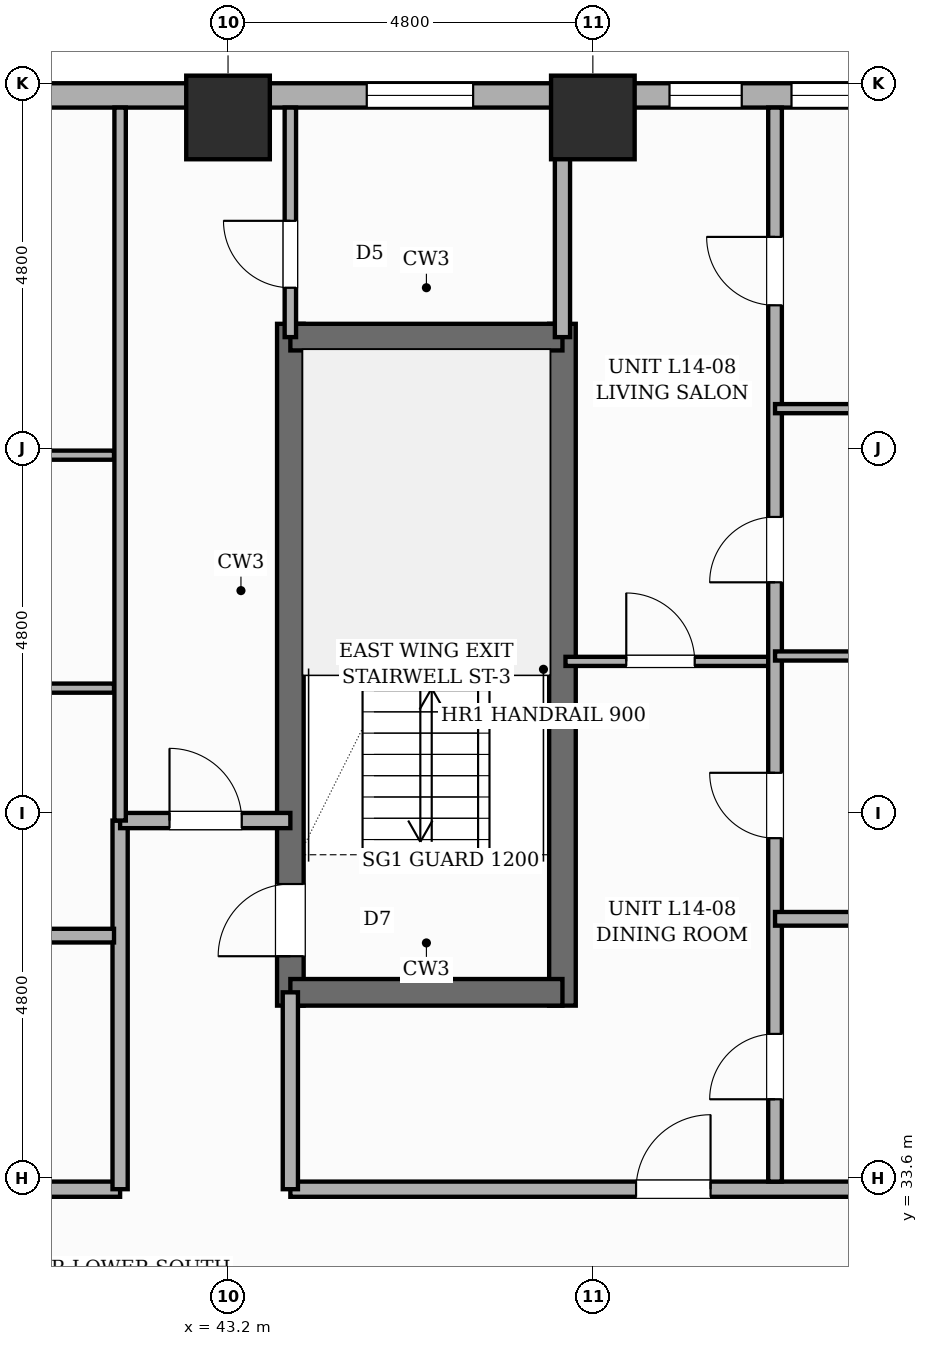
"""IFC4 building model, lengths in metres.
Left out: names, types, materials, properties, quantities, classifications, styles, units other than length and angle.
Written with IfcOpenShell. Run it as: python <this file> out.ifc"""

import sys

from ifc_helpers import new_model, si_unit, direction, frame, frame_2d, origin, origin_2d, place, context, subcontext, project, spatial, rectangle, extrude, element, fill, save


model = new_model("IFC4")
c1 = context("Model", 3, precision=1e-05, world=origin(), true_north=direction((0.0, 1.0)))
c2 = subcontext(c1, "Body", "Model", "MODEL_VIEW")
j1 = project(units=[si_unit("LENGTHUNIT", "METRE"), si_unit("PLANEANGLEUNIT", "RADIAN")], contexts=[c1])
p1 = place(None, origin())
s1 = spatial("IfcSite", under=j1, at=p1, CompositionType="ELEMENT")
p2 = place(p1, origin())
s2 = spatial("IfcBuilding", under=s1, at=p2, CompositionType="ELEMENT")
p3 = place(p2, frame((0.0, 0.0, 57.4)))
s3 = spatial("IfcBuildingStorey", under=s2, at=p3, CompositionType="ELEMENT", Elevation=57.4)
p4 = place(p3, frame((44.02, 35.865, 0.0), z_axis=(0.0, 0.0, 1.0), x_axis=(0.0, 1.0, 0.0)))
e1 = element("IfcWall", 1, at=p4, inside=s3, PredefinedType="SHEAR", context=c2, shape_type="SweptSolid", body=[
    extrude(rectangle(XDim=8.97, YDim=0.35, at=frame_2d((4.485, 0.0))), origin(), (0.0, 0.0, 1.0), 3.6),
])
p5 = place(p4, frame((0.65, 0.0, 0.0)))
e2 = element("IfcOpeningElement", 2, at=p5, cuts=e1, PredefinedType="OPENING", context=c2, shape_type="SweptSolid", body=[
    extrude(rectangle(XDim=0.95, YDim=2.1, at=frame_2d((0.475, 1.05))), frame((0.0, 0.185, 0.0), z_axis=(0.0, -1.0, 0.0), x_axis=(1.0, 0.0, 0.0)), (0.0, 0.0, 1.0), 0.37),
])
p6 = place(p3, frame((47.6, 35.865, 0.0), z_axis=(0.0, 0.0, 1.0), x_axis=(0.0, 1.0, 0.0)))
e3 = element("IfcWall", 3, at=p6, inside=s3, PredefinedType="SHEAR", context=c2, shape_type="SweptSolid", body=[
    extrude(rectangle(XDim=8.97, YDim=0.35, at=frame_2d((4.485, 0.0))), origin(), (0.0, 0.0, 1.0), 3.6),
])
for number, where, z_axis, x_axis in (
    (4, (44.02, 36.04, 0.0), (0.0, 0.0, 1.0), (1.0, 0.0, 0.0)),
    (5, (44.02, 44.66, 0.0), (0.0, 0.0, 1.0), (1.0, 0.0, 0.0)),
):
    element("IfcWall", number, at=place(p3, frame(where, z_axis=z_axis, x_axis=x_axis)), inside=s3, PredefinedType="SHEAR", context=c2, shape_type="SweptSolid", body=[
        extrude(rectangle(XDim=3.58, YDim=0.35, at=frame_2d((1.79, 0.0))), origin(), (0.0, 0.0, 1.0), 3.6),
    ])
for number, where, z_axis, x_axis in (
    (6, (43.2, 47.55, 0.0), (0.0, 0.0, 1.0), (1.0, 0.0, 0.0)),
    (7, (48.0, 47.55, 0.0), (0.0, 0.0, 1.0), (1.0, 0.0, 0.0)),
):
    element("IfcColumn", number, at=place(p3, frame(where, z_axis=z_axis, x_axis=x_axis)), inside=s3, PredefinedType="COLUMN", context=c2, shape_type="SweptSolid", body=[
        extrude(rectangle(XDim=1.1, YDim=1.1, at=origin_2d()), origin(), (0.0, 0.0, 1.0), 3.6),
    ])
p7 = place(p3, frame((7.2, 47.84, 0.0), z_axis=(0.0, 0.0, 1.0), x_axis=(1.0, 0.0, 0.0)))
e8 = element("IfcWall", 8, at=p7, inside=s3, PredefinedType="STANDARD", context=c2, shape_type="SweptSolid", body=[
    extrude(rectangle(XDim=48.0, YDim=0.32, at=frame_2d((24.0, 0.0))), origin(), (0.0, 0.0, 1.0), 2.53),
])
p8 = place(p7, frame((28.803, 0.0, 0.65)))
e9 = element("IfcOpeningElement", 9, at=p8, cuts=e8, PredefinedType="OPENING", context=c2, shape_type="SweptSolid", body=[
    extrude(rectangle(XDim=1.4, YDim=1.1, at=frame_2d((0.7, 0.55))), frame((0.0, 0.17, 0.0), z_axis=(0.0, -1.0, 0.0), x_axis=(1.0, 0.0, 0.0)), (0.0, 0.0, 1.0), 0.34),
])
p9 = place(p7, frame((43.414, 0.0, 0.45)))
e10 = element("IfcOpeningElement", 10, at=p9, cuts=e8, PredefinedType="OPENING", context=c2, shape_type="SweptSolid", body=[
    extrude(rectangle(XDim=0.95, YDim=1.8, at=frame_2d((0.475, 0.9))), frame((0.0, 0.17, 0.0), z_axis=(0.0, -1.0, 0.0), x_axis=(1.0, 0.0, 0.0)), (0.0, 0.0, 1.0), 0.34),
])
p10 = place(p7, frame((18.74, 0.0, 0.45)))
e11 = element("IfcOpeningElement", 11, at=p10, cuts=e8, PredefinedType="OPENING", context=c2, shape_type="SweptSolid", body=[
    extrude(rectangle(XDim=0.95, YDim=1.8, at=frame_2d((0.475, 0.9))), frame((0.0, 0.17, 0.0), z_axis=(0.0, -1.0, 0.0), x_axis=(1.0, 0.0, 0.0)), (0.0, 0.0, 1.0), 0.34),
])
p11 = place(p7, frame((37.825, 0.0, 0.65)))
e12 = element("IfcOpeningElement", 12, at=p11, cuts=e8, PredefinedType="OPENING", context=c2, shape_type="SweptSolid", body=[
    extrude(rectangle(XDim=1.4, YDim=1.1, at=frame_2d((0.7, 0.55))), frame((0.0, 0.17, 0.0), z_axis=(0.0, -1.0, 0.0), x_axis=(1.0, 0.0, 0.0)), (0.0, 0.0, 1.0), 0.34),
])
p12 = place(p7, frame((0.47, 0.0, 0.45)))
e13 = element("IfcOpeningElement", 13, at=p12, cuts=e8, PredefinedType="OPENING", context=c2, shape_type="SweptSolid", body=[
    extrude(rectangle(XDim=0.95, YDim=1.8, at=frame_2d((0.475, 0.9))), frame((0.0, 0.17, 0.0), z_axis=(0.0, -1.0, 0.0), x_axis=(1.0, 0.0, 0.0)), (0.0, 0.0, 1.0), 0.34),
])
p13 = place(p7, frame((5.265, 0.0, 0.45)))
e14 = element("IfcOpeningElement", 14, at=p13, cuts=e8, PredefinedType="OPENING", context=c2, shape_type="SweptSolid", body=[
    extrude(rectangle(XDim=0.95, YDim=1.8, at=frame_2d((0.475, 0.9))), frame((0.0, 0.17, 0.0), z_axis=(0.0, -1.0, 0.0), x_axis=(1.0, 0.0, 0.0)), (0.0, 0.0, 1.0), 0.34),
])
p14 = place(p7, frame((23.43, 0.0, 0.65)))
e15 = element("IfcOpeningElement", 15, at=p14, cuts=e8, PredefinedType="OPENING", context=c2, shape_type="SweptSolid", body=[
    extrude(rectangle(XDim=1.4, YDim=1.1, at=frame_2d((0.7, 0.55))), frame((0.0, 0.17, 0.0), z_axis=(0.0, -1.0, 0.0), x_axis=(1.0, 0.0, 0.0)), (0.0, 0.0, 1.0), 0.34),
])
p15 = place(p7, frame((41.809, 0.0, 0.45)))
e16 = element("IfcOpeningElement", 16, at=p15, cuts=e8, PredefinedType="OPENING", context=c2, shape_type="SweptSolid", body=[
    extrude(rectangle(XDim=0.95, YDim=1.8, at=frame_2d((0.475, 0.9))), frame((0.0, 0.17, 0.0), z_axis=(0.0, -1.0, 0.0), x_axis=(1.0, 0.0, 0.0)), (0.0, 0.0, 1.0), 0.34),
])
p16 = place(p3, frame((27.35, 33.45, 0.0), z_axis=(0.0, 0.0, 1.0), x_axis=(1.0, 0.0, 0.0)))
e17 = element("IfcWall", 17, at=p16, inside=s3, PredefinedType="PARTITIONING", context=c2, shape_type="SweptSolid", body=[
    extrude(rectangle(XDim=14.43, YDim=0.2, at=frame_2d((7.215, 0.0))), origin(), (0.0, 0.0, 1.0), 3.35),
])
p17 = place(p16, frame((4.803, 0.0, 0.0)))
e18 = element("IfcOpeningElement", 18, at=p17, cuts=e17, PredefinedType="OPENING", context=c2, shape_type="SweptSolid", body=[
    extrude(rectangle(XDim=0.98, YDim=2.18, at=frame_2d((0.49, 1.09))), frame((0.0, 0.11, 0.0), z_axis=(0.0, -1.0, 0.0), x_axis=(1.0, 0.0, 0.0)), (0.0, 0.0, 1.0), 0.22),
])
p18 = place(p3, frame((44.02, 33.45, 0.0), z_axis=(0.0, 0.0, 1.0), x_axis=(1.0, 0.0, 0.0)))
e19 = element("IfcWall", 19, at=p18, inside=s3, PredefinedType="PARTITIONING", context=c2, shape_type="SweptSolid", body=[
    extrude(rectangle(XDim=13.26, YDim=0.2, at=frame_2d((6.63, 0.0))), origin(), (0.0, 0.0, 1.0), 2.53),
])
p19 = place(p18, frame((4.549, 0.0, 0.0)))
e20 = element("IfcOpeningElement", 20, at=p19, cuts=e19, PredefinedType="OPENING", context=c2, shape_type="SweptSolid", body=[
    extrude(rectangle(XDim=0.98, YDim=2.18, at=frame_2d((0.49, 1.09))), frame((0.0, 0.11, 0.0), z_axis=(0.0, -1.0, 0.0), x_axis=(1.0, 0.0, 0.0)), (0.0, 0.0, 1.0), 0.22),
])
p20 = place(p3, frame((41.78, 33.45, 0.0), z_axis=(0.0, 0.0, 1.0), x_axis=(0.0, 1.0, 0.0)))
e21 = element("IfcWall", 21, at=p20, inside=s3, PredefinedType="PARTITIONING", context=c2, shape_type="SweptSolid", body=[
    extrude(rectangle(XDim=4.85, YDim=0.2, at=frame_2d((2.425, 0.0))), origin(), (0.0, 0.0, 1.0), 3.35),
])
p21 = place(p3, frame((41.78, 38.3, 0.0), z_axis=(0.0, 0.0, 1.0), x_axis=(1.0, 0.0, 0.0)))
e22 = element("IfcWall", 22, at=p21, inside=s3, PredefinedType="PARTITIONING", context=c2, shape_type="SweptSolid", body=[
    extrude(rectangle(XDim=2.24, YDim=0.2, at=frame_2d((1.12, 0.0))), origin(), (0.0, 0.0, 1.0), 3.35),
])
p22 = place(p21, frame((0.65, 0.0, 0.0)))
e23 = element("IfcOpeningElement", 23, at=p22, cuts=e22, PredefinedType="OPENING", context=c2, shape_type="SweptSolid", body=[
    extrude(rectangle(XDim=0.95, YDim=2.15, at=frame_2d((0.475, 1.075))), frame((0.0, 0.11, 0.0), z_axis=(0.0, -1.0, 0.0), x_axis=(1.0, 0.0, 0.0)), (0.0, 0.0, 1.0), 0.22),
])
p23 = place(p3, frame((35.577, 36.786, 0.0), z_axis=(0.0, 0.0, 1.0), x_axis=(1.0, 0.0, 0.0)))
e24 = element("IfcWall", 24, at=p23, inside=s3, PredefinedType="PLUMBINGWALL", context=c2, shape_type="SweptSolid", body=[
    extrude(rectangle(XDim=6.123, YDim=0.18, at=frame_2d((3.062, 0.0))), origin(), (0.0, 0.0, 1.0), 3.35),
])
for number, where, z_axis, x_axis in (
    (25, (35.577, 40.042, 0.0), (0.0, 0.0, 1.0), (1.0, 0.0, 0.0)),
    (26, (35.577, 43.107, 0.0), (0.0, 0.0, 1.0), (1.0, 0.0, 0.0)),
):
    element("IfcWall", number, at=place(p3, frame(where, z_axis=z_axis, x_axis=x_axis)), inside=s3, PredefinedType="PARTITIONING", context=c2, shape_type="SweptSolid", body=[
        extrude(rectangle(XDim=6.123, YDim=0.12, at=frame_2d((3.062, 0.0))), origin(), (0.0, 0.0, 1.0), 3.35),
    ])
p24 = place(p3, frame((41.78, 38.3, 0.0), z_axis=(0.0, 0.0, 1.0), x_axis=(0.0, 1.0, 0.0)))
e27 = element("IfcWall", 27, at=p24, inside=s3, PredefinedType="PARTITIONING", context=c2, shape_type="SweptSolid", body=[
    extrude(rectangle(XDim=9.38, YDim=0.15, at=frame_2d((4.69, 0.0))), origin(), (0.0, 0.0, 1.0), 3.35),
])
p25 = place(p3, frame((47.64, 40.394, 0.0), z_axis=(0.0, 0.0, 1.0), x_axis=(1.0, 0.0, 0.0)))
e28 = element("IfcWall", 28, at=p25, inside=s3, PredefinedType="PARTITIONING", context=c2, shape_type="SweptSolid", body=[
    extrude(rectangle(XDim=2.757, YDim=0.12, at=frame_2d((1.378, 0.0))), origin(), (0.0, 0.0, 1.0), 3.35),
])
p26 = place(p25, frame((0.8, 0.0, 0.0)))
e29 = element("IfcOpeningElement", 29, at=p26, cuts=e28, PredefinedType="OPENING", context=c2, shape_type="SweptSolid", body=[
    extrude(rectangle(XDim=0.9, YDim=2.15, at=frame_2d((0.45, 1.075))), frame((0.0, 0.07, 0.0), z_axis=(0.0, -1.0, 0.0), x_axis=(1.0, 0.0, 0.0)), (0.0, 0.0, 1.0), 0.14),
])
p27 = place(p3, frame((50.397, 33.55, 0.0), z_axis=(0.0, 0.0, 1.0), x_axis=(0.0, 1.0, 0.0)))
e30 = element("IfcWall", 30, at=p27, inside=s3, PredefinedType="PLUMBINGWALL", context=c2, shape_type="SweptSolid", body=[
    extrude(rectangle(XDim=14.13, YDim=0.18, at=frame_2d((7.065, 0.0))), origin(), (0.0, 0.0, 1.0), 3.35),
])
p28 = place(p27, frame((1.083, 0.0, 0.0)))
e31 = element("IfcOpeningElement", 31, at=p28, cuts=e30, PredefinedType="OPENING", context=c2, shape_type="SweptSolid", body=[
    extrude(rectangle(XDim=0.86, YDim=2.1, at=frame_2d((0.43, 1.05))), frame((0.0, 0.1, 0.0), z_axis=(0.0, -1.0, 0.0), x_axis=(1.0, 0.0, 0.0)), (0.0, 0.0, 1.0), 0.2),
])
p29 = place(p27, frame((4.518, 0.0, 0.0)))
e32 = element("IfcOpeningElement", 32, at=p29, cuts=e30, PredefinedType="OPENING", context=c2, shape_type="SweptSolid", body=[
    extrude(rectangle(XDim=0.86, YDim=2.1, at=frame_2d((0.43, 1.05))), frame((0.0, 0.1, 0.0), z_axis=(0.0, -1.0, 0.0), x_axis=(1.0, 0.0, 0.0)), (0.0, 0.0, 1.0), 0.2),
])
p30 = place(p27, frame((7.884, 0.0, 0.0)))
e33 = element("IfcOpeningElement", 33, at=p30, cuts=e30, PredefinedType="OPENING", context=c2, shape_type="SweptSolid", body=[
    extrude(rectangle(XDim=0.86, YDim=2.1, at=frame_2d((0.43, 1.05))), frame((0.0, 0.1, 0.0), z_axis=(0.0, -1.0, 0.0), x_axis=(1.0, 0.0, 0.0)), (0.0, 0.0, 1.0), 0.2),
])
p31 = place(p27, frame((11.528, 0.0, 0.0)))
e34 = element("IfcOpeningElement", 34, at=p31, cuts=e30, PredefinedType="OPENING", context=c2, shape_type="SweptSolid", body=[
    extrude(rectangle(XDim=0.9, YDim=2.15, at=frame_2d((0.45, 1.075))), frame((0.0, 0.1, 0.0), z_axis=(0.0, -1.0, 0.0), x_axis=(1.0, 0.0, 0.0)), (0.0, 0.0, 1.0), 0.2),
])
p32 = place(p3, frame((50.397, 37.007, 0.0), z_axis=(0.0, 0.0, 1.0), x_axis=(1.0, 0.0, 0.0)))
e35 = element("IfcWall", 35, at=p32, inside=s3, PredefinedType="PLUMBINGWALL", context=c2, shape_type="SweptSolid", body=[
    extrude(rectangle(XDim=6.883, YDim=0.18, at=frame_2d((3.441, 0.0))), origin(), (0.0, 0.0, 1.0), 3.35),
])
for number, where, z_axis, x_axis in (
    (36, (50.397, 40.465, 0.0), (0.0, 0.0, 1.0), (1.0, 0.0, 0.0)),
    (37, (50.397, 43.719, 0.0), (0.0, 0.0, 1.0), (1.0, 0.0, 0.0)),
):
    element("IfcWall", number, at=place(p3, frame(where, z_axis=z_axis, x_axis=x_axis)), inside=s3, PredefinedType="PARTITIONING", context=c2, shape_type="SweptSolid", body=[
        extrude(rectangle(XDim=6.883, YDim=0.12, at=frame_2d((3.441, 0.0))), origin(), (0.0, 0.0, 1.0), 3.35),
    ])
p33 = place(p3, frame((44.02, 44.66, 0.0), z_axis=(0.0, 0.0, 1.0), x_axis=(0.0, 1.0, 0.0)))
e38 = element("IfcWall", 38, at=p33, inside=s3, PredefinedType="PARTITIONING", context=c2, shape_type="SweptSolid", body=[
    extrude(rectangle(XDim=3.02, YDim=0.15, at=frame_2d((1.51, 0.0))), origin(), (0.0, 0.0, 1.0), 3.35),
])
p34 = place(p33, frame((0.65, 0.0, 0.0)))
e39 = element("IfcOpeningElement", 39, at=p34, cuts=e38, PredefinedType="OPENING", context=c2, shape_type="SweptSolid", body=[
    extrude(rectangle(XDim=0.88, YDim=2.1, at=frame_2d((0.44, 1.05))), frame((0.0, 0.085, 0.0), z_axis=(0.0, -1.0, 0.0), x_axis=(1.0, 0.0, 0.0)), (0.0, 0.0, 1.0), 0.17),
])
p35 = place(p3, frame((47.6, 44.66, 0.0), z_axis=(0.0, 0.0, 1.0), x_axis=(0.0, 1.0, 0.0)))
e40 = element("IfcWall", 40, at=p35, inside=s3, PredefinedType="SOLIDWALL", context=c2, shape_type="SweptSolid", body=[
    extrude(rectangle(XDim=3.02, YDim=0.2, at=frame_2d((1.51, 0.0))), origin(), (0.0, 0.0, 1.0), 3.35),
])
p36 = place(p3, frame((44.02, 33.45, 0.0), z_axis=(0.0, 0.0, 1.0), x_axis=(0.0, 1.0, 0.0)))
e41 = element("IfcWall", 41, at=p36, inside=s3, PredefinedType="SOLIDWALL", context=c2, shape_type="SweptSolid", body=[
    extrude(rectangle(XDim=2.59, YDim=0.2, at=frame_2d((1.295, 0.0))), origin(), (0.0, 0.0, 1.0), 3.35),
])
p37 = place(p9, origin())
e42 = element("IfcWindow", 42, at=p37, inside=s3, PartitioningType="SINGLE_PANEL", PredefinedType="WINDOW", context=c2, shape_type="SweptSolid", body=[
    extrude(rectangle(XDim=0.95, YDim=1.8, at=frame_2d((0.475, 0.9))), frame((0.0, 0.03, 0.0), z_axis=(0.0, -1.0, 0.0), x_axis=(1.0, 0.0, 0.0)), (0.0, 0.0, 1.0), 0.06),
])
fill(e10, e42)
p38 = place(p11, origin())
e43 = element("IfcWindow", 43, at=p38, inside=s3, PartitioningType="SINGLE_PANEL", PredefinedType="WINDOW", context=c2, shape_type="SweptSolid", body=[
    extrude(rectangle(XDim=1.4, YDim=1.1, at=frame_2d((0.7, 0.55))), frame((0.0, 0.03, 0.0), z_axis=(0.0, -1.0, 0.0), x_axis=(1.0, 0.0, 0.0)), (0.0, 0.0, 1.0), 0.06),
])
fill(e12, e43)
p39 = place(p15, origin())
e44 = element("IfcWindow", 44, at=p39, inside=s3, PartitioningType="SINGLE_PANEL", PredefinedType="WINDOW", context=c2, shape_type="SweptSolid", body=[
    extrude(rectangle(XDim=0.95, YDim=1.8, at=frame_2d((0.475, 0.9))), frame((0.0, 0.03, 0.0), z_axis=(0.0, -1.0, 0.0), x_axis=(1.0, 0.0, 0.0)), (0.0, 0.0, 1.0), 0.06),
])
fill(e16, e44)
p40 = place(p5, origin())
e45 = element("IfcDoor", 45, at=p40, inside=s3, OperationType="SINGLE_SWING_LEFT", PredefinedType="DOOR", context=c2, shape_type="SweptSolid", body=[
    extrude(rectangle(XDim=0.95, YDim=2.1, at=frame_2d((0.475, 1.05))), frame((0.0, 0.025, 0.0), z_axis=(0.0, -1.0, 0.0), x_axis=(1.0, 0.0, 0.0)), (0.0, 0.0, 1.0), 0.05),
])
fill(e2, e45)
p41 = place(p22, origin())
e46 = element("IfcDoor", 46, at=p41, inside=s3, OperationType="SINGLE_SWING_LEFT", PredefinedType="DOOR", context=c2, shape_type="SweptSolid", body=[
    extrude(rectangle(XDim=0.95, YDim=2.15, at=frame_2d((0.475, 1.075))), frame((0.0, 0.025, 0.0), z_axis=(0.0, -1.0, 0.0), x_axis=(1.0, 0.0, 0.0)), (0.0, 0.0, 1.0), 0.05),
])
fill(e23, e46)
p42 = place(p19, origin())
e47 = element("IfcDoor", 47, at=p42, inside=s3, OperationType="SINGLE_SWING_RIGHT", PredefinedType="DOOR", context=c2, shape_type="SweptSolid", body=[
    extrude(rectangle(XDim=0.98, YDim=2.18, at=frame_2d((0.49, 1.09))), frame((0.0, 0.025, 0.0), z_axis=(0.0, -1.0, 0.0), x_axis=(1.0, 0.0, 0.0)), (0.0, 0.0, 1.0), 0.05),
])
fill(e20, e47)
p43 = place(p26, origin())
e48 = element("IfcDoor", 48, at=p43, inside=s3, OperationType="SINGLE_SWING_LEFT", PredefinedType="DOOR", context=c2, shape_type="SweptSolid", body=[
    extrude(rectangle(XDim=0.9, YDim=2.15, at=frame_2d((0.45, 1.075))), frame((0.0, 0.025, 0.0), z_axis=(0.0, -1.0, 0.0), x_axis=(1.0, 0.0, 0.0)), (0.0, 0.0, 1.0), 0.05),
])
fill(e29, e48)
p44 = place(p28, origin())
e49 = element("IfcDoor", 49, at=p44, inside=s3, OperationType="SINGLE_SWING_LEFT", PredefinedType="DOOR", context=c2, shape_type="SweptSolid", body=[
    extrude(rectangle(XDim=0.86, YDim=2.1, at=frame_2d((0.43, 1.05))), frame((0.0, 0.025, 0.0), z_axis=(0.0, -1.0, 0.0), x_axis=(1.0, 0.0, 0.0)), (0.0, 0.0, 1.0), 0.05),
])
fill(e31, e49)
p45 = place(p29, origin())
e50 = element("IfcDoor", 50, at=p45, inside=s3, OperationType="SINGLE_SWING_RIGHT", PredefinedType="DOOR", context=c2, shape_type="SweptSolid", body=[
    extrude(rectangle(XDim=0.86, YDim=2.1, at=frame_2d((0.43, 1.05))), frame((0.0, 0.025, 0.0), z_axis=(0.0, -1.0, 0.0), x_axis=(1.0, 0.0, 0.0)), (0.0, 0.0, 1.0), 0.05),
])
fill(e32, e50)
p46 = place(p30, origin())
e51 = element("IfcDoor", 51, at=p46, inside=s3, OperationType="SINGLE_SWING_LEFT", PredefinedType="DOOR", context=c2, shape_type="SweptSolid", body=[
    extrude(rectangle(XDim=0.86, YDim=2.1, at=frame_2d((0.43, 1.05))), frame((0.0, 0.025, 0.0), z_axis=(0.0, -1.0, 0.0), x_axis=(1.0, 0.0, 0.0)), (0.0, 0.0, 1.0), 0.05),
])
fill(e33, e51)
p47 = place(p31, origin())
e52 = element("IfcDoor", 52, at=p47, inside=s3, OperationType="SINGLE_SWING_RIGHT", PredefinedType="DOOR", context=c2, shape_type="SweptSolid", body=[
    extrude(rectangle(XDim=0.9, YDim=2.15, at=frame_2d((0.45, 1.075))), frame((0.0, 0.025, 0.0), z_axis=(0.0, -1.0, 0.0), x_axis=(1.0, 0.0, 0.0)), (0.0, 0.0, 1.0), 0.05),
])
fill(e34, e52)
p48 = place(p34, origin())
e53 = element("IfcDoor", 53, at=p48, inside=s3, OperationType="SINGLE_SWING_RIGHT", PredefinedType="DOOR", context=c2, shape_type="SweptSolid", body=[
    extrude(rectangle(XDim=0.88, YDim=2.1, at=frame_2d((0.44, 1.05))), frame((0.0, 0.025, 0.0), z_axis=(0.0, -1.0, 0.0), x_axis=(1.0, 0.0, 0.0)), (0.0, 0.0, 1.0), 0.05),
])
fill(e39, e53)
save(model, sys.argv[1])
